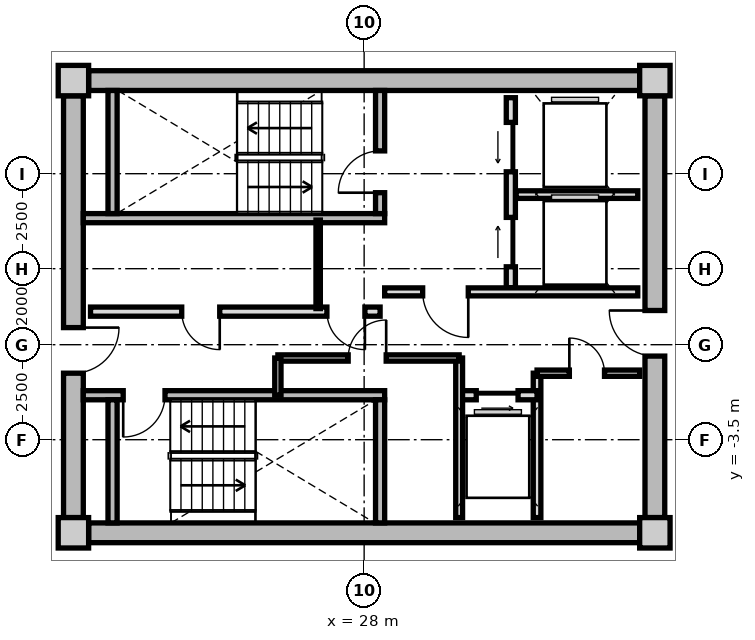
"""IFC4 building model, lengths in metres.
Left out: names, types, materials, properties, quantities, classifications, styles, units other than length and angle.
Written with IfcOpenShell. Run it as: python <this file> out.ifc"""

import sys

from ifc_helpers import new_model, si_unit, direction, frame, frame_2d, origin, origin_2d, place, context, subcontext, project, spatial, rectangle, extrude, source, transform, mapped, element, fill, save


model = new_model("IFC4")
c1 = context("Model", 3, precision=1e-05, world=origin(), true_north=direction((0.0, 1.0)))
c2 = subcontext(c1, "Body", "Model", "MODEL_VIEW")
j1 = project(units=[si_unit("LENGTHUNIT", "METRE"), si_unit("PLANEANGLEUNIT", "RADIAN")], contexts=[c1])
p1 = place(None, origin())
s1 = spatial("IfcSite", under=j1, at=p1, CompositionType="ELEMENT")
p2 = place(p1, origin())
s2 = spatial("IfcBuilding", under=s1, at=p2, CompositionType="ELEMENT")
p3 = place(p2, frame((0.0, 0.0, 216.95)))
s3 = spatial("IfcBuildingStorey", under=s2, at=p3, CompositionType="ELEMENT", Elevation=216.95)
m1 = source(origin(), c2, "Body", "SweptSolid", [
    extrude(rectangle(XDim=0.8, YDim=0.8, at=origin_2d()), origin(), (0.0, 0.0, 1.0), 3.05),
])
for number, where, z_axis, x_axis in (
    (1, (20.35, -5.95, 0.0), (0.0, 0.0, 1.0), (1.0, 0.0, 0.0)),
    (2, (35.65, -5.95, 0.0), (0.0, 0.0, 1.0), (1.0, 0.0, 0.0)),
    (3, (35.65, 5.95, 0.0), (0.0, 0.0, 1.0), (1.0, 0.0, 0.0)),
    (4, (20.35, 5.95, 0.0), (0.0, 0.0, 1.0), (1.0, 0.0, 0.0)),
):
    element("IfcColumn", number, at=place(p3, frame(where, z_axis=z_axis, x_axis=x_axis)), inside=s3, PredefinedType="COLUMN", context=c2, shape_type="MappedRepresentation", body=[
        mapped(m1, transform((0.0, 0.0, 0.0), x_axis=(1.0, 0.0, 0.0), y_axis=(0.0, 1.0, 0.0), z_axis=(0.0, 0.0, 1.0), scale=1.0)),
    ])
m2 = source(origin(), c2, "Body", "SweptSolid", [
    extrude(rectangle(XDim=14.5, YDim=0.52, at=frame_2d((7.25, 0.0))), origin(), (0.0, 0.0, 1.0), 2.76),
])
for number, where, z_axis, x_axis in (
    (5, (20.75, 5.95, 0.0), (0.0, 0.0, 1.0), (1.0, 0.0, 0.0)),
    (6, (35.25, -5.95, 0.0), (0.0, 0.0, 1.0), (-1.0, 0.0, 0.0)),
):
    element("IfcWall", number, at=place(p3, frame(where, z_axis=z_axis, x_axis=x_axis)), inside=s3, PredefinedType="SHEAR", context=c2, shape_type="MappedRepresentation", body=[
        mapped(m2, transform((0.0, 0.0, 0.0), x_axis=(1.0, 0.0, 0.0), y_axis=(0.0, 1.0, 0.0), z_axis=(0.0, 0.0, 1.0), scale=1.0)),
    ])
m3 = source(origin(), c2, "Body", "SweptSolid", [
    extrude(rectangle(XDim=11.1, YDim=0.52, at=frame_2d((5.55, 0.0))), origin(), (0.0, 0.0, 1.0), 2.76),
])
p4 = place(p3, frame((20.35, -5.55, 0.0), z_axis=(0.0, 0.0, 1.0), x_axis=(0.0, 1.0, 0.0)))
e7 = element("IfcWall", 7, at=p4, inside=s3, PredefinedType="SHEAR", context=c2, shape_type="MappedRepresentation", body=[
    mapped(m3, transform((0.0, 0.0, 0.0), x_axis=(1.0, 0.0, 0.0), y_axis=(0.0, 1.0, 0.0), z_axis=(0.0, 0.0, 1.0), scale=1.0)),
])
p5 = place(p4, frame((3.8, 0.0, 0.0)))
e8 = element("IfcOpeningElement", 8, at=p5, cuts=e7, PredefinedType="OPENING", context=c2, shape_type="SweptSolid", body=[
    extrude(rectangle(XDim=1.2, YDim=2.15, at=frame_2d((0.6, 1.075))), frame((0.0, 0.27, 0.0), z_axis=(0.0, -1.0, 0.0), x_axis=(1.0, 0.0, 0.0)), (0.0, 0.0, 1.0), 0.54),
])
p6 = place(p3, frame((35.65, 5.55, 0.0), z_axis=(0.0, 0.0, 1.0), x_axis=(0.0, -1.0, 0.0)))
e9 = element("IfcWall", 9, at=p6, inside=s3, PredefinedType="SHEAR", context=c2, shape_type="MappedRepresentation", body=[
    mapped(m3, transform((0.0, 0.0, 0.0), x_axis=(1.0, 0.0, 0.0), y_axis=(0.0, 1.0, 0.0), z_axis=(0.0, 0.0, 1.0), scale=1.0)),
])
p7 = place(p6, frame((5.65, 0.0, 0.0)))
e10 = element("IfcOpeningElement", 10, at=p7, cuts=e9, PredefinedType="OPENING", context=c2, shape_type="SweptSolid", body=[
    extrude(rectangle(XDim=1.2, YDim=2.15, at=frame_2d((0.6, 1.075))), frame((0.0, 0.27, 0.0), z_axis=(0.0, -1.0, 0.0), x_axis=(1.0, 0.0, 0.0)), (0.0, 0.0, 1.0), 0.54),
])
m4 = source(origin(), c2, "Body", "SweptSolid", [
    extrude(rectangle(XDim=7.93, YDim=0.24, at=frame_2d((3.965, 0.0))), origin(), (0.0, 0.0, 1.0), 2.76),
])
p8 = place(p3, frame((20.61, 2.33, 0.0), z_axis=(0.0, 0.0, 1.0), x_axis=(1.0, 0.0, 0.0)))
e11 = element("IfcWall", 11, at=p8, inside=s3, PredefinedType="PARTITIONING", context=c2, shape_type="MappedRepresentation", body=[
    mapped(m4, transform((0.0, 0.0, 0.0), x_axis=(1.0, 0.0, 0.0), y_axis=(0.0, 1.0, 0.0), z_axis=(0.0, 0.0, 1.0), scale=1.0)),
])
m5 = source(origin(), c2, "Body", "SweptSolid", [
    extrude(rectangle(XDim=3.24, YDim=0.24, at=frame_2d((1.62, 0.0))), origin(), (0.0, 0.0, 1.0), 2.76),
])
p9 = place(p3, frame((21.38, 2.45, 0.0), z_axis=(0.0, 0.0, 1.0), x_axis=(0.0, 1.0, 0.0)))
e12 = element("IfcWall", 12, at=p9, inside=s3, PredefinedType="PARTITIONING", context=c2, shape_type="MappedRepresentation", body=[
    mapped(m5, transform((0.0, 0.0, 0.0), x_axis=(1.0, 0.0, 0.0), y_axis=(0.0, 1.0, 0.0), z_axis=(0.0, 0.0, 1.0), scale=1.0)),
])
p10 = place(p3, frame((28.42, 2.45, 0.0), z_axis=(0.0, 0.0, 1.0), x_axis=(0.0, 1.0, 0.0)))
e13 = element("IfcWall", 13, at=p10, inside=s3, PredefinedType="PARTITIONING", context=c2, shape_type="MappedRepresentation", body=[
    mapped(m5, transform((0.0, 0.0, 0.0), x_axis=(1.0, 0.0, 0.0), y_axis=(0.0, 1.0, 0.0), z_axis=(0.0, 0.0, 1.0), scale=1.0)),
])
p11 = place(p10, frame((0.55, 0.0, 0.0)))
e14 = element("IfcOpeningElement", 14, at=p11, cuts=e13, PredefinedType="OPENING", context=c2, shape_type="SweptSolid", body=[
    extrude(rectangle(XDim=1.1, YDim=2.15, at=frame_2d((0.55, 1.075))), frame((0.0, 0.13, 0.0), z_axis=(0.0, -1.0, 0.0), x_axis=(1.0, 0.0, 0.0)), (0.0, 0.0, 1.0), 0.26),
])
p12 = place(p3, frame((20.61, -2.33, 0.0), z_axis=(0.0, 0.0, 1.0), x_axis=(1.0, 0.0, 0.0)))
e15 = element("IfcWall", 15, at=p12, inside=s3, PredefinedType="PARTITIONING", context=c2, shape_type="MappedRepresentation", body=[
    mapped(m4, transform((0.0, 0.0, 0.0), x_axis=(1.0, 0.0, 0.0), y_axis=(0.0, 1.0, 0.0), z_axis=(0.0, 0.0, 1.0), scale=1.0)),
])
p13 = place(p12, frame((1.05, 0.0, 0.0)))
e16 = element("IfcOpeningElement", 16, at=p13, cuts=e15, PredefinedType="OPENING", context=c2, shape_type="SweptSolid", body=[
    extrude(rectangle(XDim=1.1, YDim=2.15, at=frame_2d((0.55, 1.075))), frame((0.0, 0.13, 0.0), z_axis=(0.0, -1.0, 0.0), x_axis=(1.0, 0.0, 0.0)), (0.0, 0.0, 1.0), 0.26),
])
for number, where, z_axis, x_axis in (
    (17, (21.38, -5.69, 0.0), (0.0, 0.0, 1.0), (0.0, 1.0, 0.0)),
    (18, (28.42, -5.69, 0.0), (0.0, 0.0, 1.0), (0.0, 1.0, 0.0)),
):
    element("IfcWall", number, at=place(p3, frame(where, z_axis=z_axis, x_axis=x_axis)), inside=s3, PredefinedType="PARTITIONING", context=c2, shape_type="MappedRepresentation", body=[
        mapped(m5, transform((0.0, 0.0, 0.0), x_axis=(1.0, 0.0, 0.0), y_axis=(0.0, 1.0, 0.0), z_axis=(0.0, 0.0, 1.0), scale=1.0)),
    ])
m6 = source(origin(), c2, "Body", "SweptSolid", [
    extrude(rectangle(XDim=5.0, YDim=0.24, at=frame_2d((2.5, 0.0))), origin(), (0.0, 0.0, 1.0), 2.745),
])
p14 = place(p3, frame((31.86, 0.5, 0.0), z_axis=(0.0, 0.0, 1.0), x_axis=(0.0, 1.0, 0.0)))
e19 = element("IfcWall", 19, at=p14, inside=s3, PredefinedType="PARTITIONING", context=c2, shape_type="MappedRepresentation", body=[
    mapped(m6, transform((0.0, 0.0, 0.0), x_axis=(1.0, 0.0, 0.0), y_axis=(0.0, 1.0, 0.0), z_axis=(0.0, 0.0, 1.0), scale=1.0)),
])
p15 = place(p14, frame((3.05, 0.0, 0.0)))
e20 = element("IfcOpeningElement", 20, at=p15, cuts=e19, PredefinedType="OPENING", context=c2, shape_type="SweptSolid", body=[
    extrude(rectangle(XDim=1.3, YDim=2.2, at=frame_2d((0.65, 1.1))), frame((0.0, 0.13, 0.0), z_axis=(0.0, -1.0, 0.0), x_axis=(1.0, 0.0, 0.0)), (0.0, 0.0, 1.0), 0.26),
])
p16 = place(p14, frame((0.55, 0.0, 0.0)))
e21 = element("IfcOpeningElement", 21, at=p16, cuts=e19, PredefinedType="OPENING", context=c2, shape_type="SweptSolid", body=[
    extrude(rectangle(XDim=1.3, YDim=2.2, at=frame_2d((0.65, 1.1))), frame((0.0, 0.13, 0.0), z_axis=(0.0, -1.0, 0.0), x_axis=(1.0, 0.0, 0.0)), (0.0, 0.0, 1.0), 0.26),
])
m7 = source(origin(), c2, "Body", "SweptSolid", [
    extrude(rectangle(XDim=3.2, YDim=0.2, at=frame_2d((1.6, 0.0))), origin(), (0.0, 0.0, 1.0), 2.745),
])
p17 = place(p3, frame((32.0, 2.95, 0.0), z_axis=(0.0, 0.0, 1.0), x_axis=(1.0, 0.0, 0.0)))
e22 = element("IfcWall", 22, at=p17, inside=s3, PredefinedType="PARTITIONING", context=c2, shape_type="MappedRepresentation", body=[
    mapped(m7, transform((0.0, 0.0, 0.0), x_axis=(1.0, 0.0, 0.0), y_axis=(0.0, 1.0, 0.0), z_axis=(0.0, 0.0, 1.0), scale=1.0)),
])
m8 = source(origin(), c2, "Body", "SweptSolid", [
    extrude(rectangle(XDim=6.66, YDim=0.21, at=frame_2d((3.33, 0.0))), origin(), (0.0, 0.0, 1.0), 2.745),
])
p18 = place(p3, frame((28.54, 0.39, 0.0), z_axis=(0.0, 0.0, 1.0), x_axis=(1.0, 0.0, 0.0)))
e23 = element("IfcWall", 23, at=p18, inside=s3, PredefinedType="PARTITIONING", context=c2, shape_type="MappedRepresentation", body=[
    mapped(m8, transform((0.0, 0.0, 0.0), x_axis=(1.0, 0.0, 0.0), y_axis=(0.0, 1.0, 0.0), z_axis=(0.0, 0.0, 1.0), scale=1.0)),
])
p19 = place(p18, frame((1.0, 0.0, 0.0)))
e24 = element("IfcOpeningElement", 24, at=p19, cuts=e23, PredefinedType="OPENING", context=c2, shape_type="SweptSolid", body=[
    extrude(rectangle(XDim=1.2, YDim=2.15, at=frame_2d((0.6, 1.075))), frame((0.0, 0.115, 0.0), z_axis=(0.0, -1.0, 0.0), x_axis=(1.0, 0.0, 0.0)), (0.0, 0.0, 1.0), 0.23),
])
m9 = source(origin(), c2, "Body", "SweptSolid", [
    extrude(rectangle(XDim=7.62, YDim=0.24, at=frame_2d((3.81, 0.0))), origin(), (0.0, 0.0, 1.0), 2.745),
])
p20 = place(p3, frame((20.8, -0.13, 0.0), z_axis=(0.0, 0.0, 1.0), x_axis=(1.0, 0.0, 0.0)))
e25 = element("IfcWall", 25, at=p20, inside=s3, PredefinedType="PARTITIONING", context=c2, shape_type="MappedRepresentation", body=[
    mapped(m9, transform((0.0, 0.0, 0.0), x_axis=(1.0, 0.0, 0.0), y_axis=(0.0, 1.0, 0.0), z_axis=(0.0, 0.0, 1.0), scale=1.0)),
])
p21 = place(p20, frame((6.22, 0.0, 0.0)))
e26 = element("IfcOpeningElement", 26, at=p21, cuts=e25, PredefinedType="OPENING", context=c2, shape_type="SweptSolid", body=[
    extrude(rectangle(XDim=1.0, YDim=2.1, at=frame_2d((0.5, 1.05))), frame((0.0, 0.13, 0.0), z_axis=(0.0, -1.0, 0.0), x_axis=(1.0, 0.0, 0.0)), (0.0, 0.0, 1.0), 0.26),
])
p22 = place(p20, frame((2.4, 0.0, 0.0)))
e27 = element("IfcOpeningElement", 27, at=p22, cuts=e25, PredefinedType="OPENING", context=c2, shape_type="SweptSolid", body=[
    extrude(rectangle(XDim=1.0, YDim=2.1, at=frame_2d((0.5, 1.05))), frame((0.0, 0.13, 0.0), z_axis=(0.0, -1.0, 0.0), x_axis=(1.0, 0.0, 0.0)), (0.0, 0.0, 1.0), 0.26),
])
m10 = source(origin(), c2, "Body", "SweptSolid", [
    extrude(rectangle(XDim=2.33, YDim=0.115, at=frame_2d((1.165, 0.0))), origin(), (0.0, 0.0, 1.0), 2.745),
])
p23 = place(p3, frame((26.79, -0.05, 0.0), z_axis=(0.0, 0.0, 1.0), x_axis=(0.0, 1.0, 0.0)))
e28 = element("IfcWall", 28, at=p23, inside=s3, PredefinedType="PARTITIONING", context=c2, shape_type="MappedRepresentation", body=[
    mapped(m10, transform((0.0, 0.0, 0.0), x_axis=(1.0, 0.0, 0.0), y_axis=(0.0, 1.0, 0.0), z_axis=(0.0, 0.0, 1.0), scale=1.0)),
])
m11 = source(origin(), c2, "Body", "SweptSolid", [
    extrude(rectangle(XDim=3.8, YDim=0.2, at=frame_2d((1.9, 0.0))), origin(), (0.0, 0.0, 1.0), 2.745),
])
p24 = place(p3, frame((32.55, -5.55, 0.0), z_axis=(0.0, 0.0, 1.0), x_axis=(0.0, 1.0, 0.0)))
e29 = element("IfcWall", 29, at=p24, inside=s3, PredefinedType="PARTITIONING", context=c2, shape_type="MappedRepresentation", body=[
    mapped(m11, transform((0.0, 0.0, 0.0), x_axis=(1.0, 0.0, 0.0), y_axis=(0.0, 1.0, 0.0), z_axis=(0.0, 0.0, 1.0), scale=1.0)),
])
m12 = source(origin(), c2, "Body", "SweptSolid", [
    extrude(rectangle(XDim=2.05, YDim=0.24, at=frame_2d((1.025, 0.0))), origin(), (0.0, 0.0, 1.0), 2.745),
])
p25 = place(p3, frame((30.5, -2.33, 0.0), z_axis=(0.0, 0.0, 1.0), x_axis=(1.0, 0.0, 0.0)))
e30 = element("IfcWall", 30, at=p25, inside=s3, PredefinedType="PARTITIONING", context=c2, shape_type="MappedRepresentation", body=[
    mapped(m12, transform((0.0, 0.0, 0.0), x_axis=(1.0, 0.0, 0.0), y_axis=(0.0, 1.0, 0.0), z_axis=(0.0, 0.0, 1.0), scale=1.0)),
])
p26 = place(p25, frame((0.45, 0.0, 0.0)))
e31 = element("IfcOpeningElement", 31, at=p26, cuts=e30, PredefinedType="OPENING", context=c2, shape_type="SweptSolid", body=[
    extrude(rectangle(XDim=1.1, YDim=2.2, at=frame_2d((0.55, 1.1))), frame((0.0, 0.13, 0.0), z_axis=(0.0, -1.0, 0.0), x_axis=(1.0, 0.0, 0.0)), (0.0, 0.0, 1.0), 0.26),
])
m13 = source(origin(), c2, "Body", "SweptSolid", [
    extrude(rectangle(XDim=4.2, YDim=0.18, at=frame_2d((2.1, 0.0))), origin(), (0.0, 0.0, 1.0), 2.745),
])
p27 = place(p3, frame((30.5, -5.55, 0.0), z_axis=(0.0, 0.0, 1.0), x_axis=(0.0, 1.0, 0.0)))
e32 = element("IfcWall", 32, at=p27, inside=s3, PredefinedType="PARTITIONING", context=c2, shape_type="MappedRepresentation", body=[
    mapped(m13, transform((0.0, 0.0, 0.0), x_axis=(1.0, 0.0, 0.0), y_axis=(0.0, 1.0, 0.0), z_axis=(0.0, 0.0, 1.0), scale=1.0)),
])
m14 = source(origin(), c2, "Body", "SweptSolid", [
    extrude(rectangle(XDim=4.77, YDim=0.165, at=frame_2d((2.385, 0.0))), origin(), (0.0, 0.0, 1.0), 2.745),
])
p28 = place(p3, frame((25.73, -1.35, 0.0), z_axis=(0.0, 0.0, 1.0), x_axis=(1.0, 0.0, 0.0)))
e33 = element("IfcWall", 33, at=p28, inside=s3, PredefinedType="PARTITIONING", context=c2, shape_type="MappedRepresentation", body=[
    mapped(m14, transform((0.0, 0.0, 0.0), x_axis=(1.0, 0.0, 0.0), y_axis=(0.0, 1.0, 0.0), z_axis=(0.0, 0.0, 1.0), scale=1.0)),
])
p29 = place(p28, frame((1.85, 0.0, 0.0)))
e34 = element("IfcOpeningElement", 34, at=p29, cuts=e33, PredefinedType="OPENING", context=c2, shape_type="SweptSolid", body=[
    extrude(rectangle(XDim=1.0, YDim=2.1, at=frame_2d((0.5, 1.05))), frame((0.0, 0.093, 0.0), z_axis=(0.0, -1.0, 0.0), x_axis=(1.0, 0.0, 0.0)), (0.0, 0.0, 1.0), 0.185),
])
m15 = source(origin(), c2, "Body", "SweptSolid", [
    extrude(rectangle(XDim=0.98, YDim=0.165, at=frame_2d((0.49, 0.0))), origin(), (0.0, 0.0, 1.0), 2.745),
])
p30 = place(p3, frame((25.73, -2.33, 0.0), z_axis=(0.0, 0.0, 1.0), x_axis=(0.0, 1.0, 0.0)))
e35 = element("IfcWall", 35, at=p30, inside=s3, PredefinedType="PARTITIONING", context=c2, shape_type="MappedRepresentation", body=[
    mapped(m15, transform((0.0, 0.0, 0.0), x_axis=(1.0, 0.0, 0.0), y_axis=(0.0, 1.0, 0.0), z_axis=(0.0, 0.0, 1.0), scale=1.0)),
])
m16 = source(origin(), c2, "Body", "SweptSolid", [
    extrude(rectangle(XDim=2.7, YDim=0.165, at=frame_2d((1.35, 0.0))), origin(), (0.0, 0.0, 1.0), 2.745),
])
p31 = place(p3, frame((32.55, -1.75, 0.0), z_axis=(0.0, 0.0, 1.0), x_axis=(1.0, 0.0, 0.0)))
e36 = element("IfcWall", 36, at=p31, inside=s3, PredefinedType="PARTITIONING", context=c2, shape_type="MappedRepresentation", body=[
    mapped(m16, transform((0.0, 0.0, 0.0), x_axis=(1.0, 0.0, 0.0), y_axis=(0.0, 1.0, 0.0), z_axis=(0.0, 0.0, 1.0), scale=1.0)),
])
p32 = place(p31, frame((0.85, 0.0, 0.0)))
e37 = element("IfcOpeningElement", 37, at=p32, cuts=e36, PredefinedType="OPENING", context=c2, shape_type="SweptSolid", body=[
    extrude(rectangle(XDim=0.925, YDim=2.1, at=frame_2d((0.462, 1.05))), frame((0.0, 0.093, 0.0), z_axis=(0.0, -1.0, 0.0), x_axis=(1.0, 0.0, 0.0)), (0.0, 0.0, 1.0), 0.185),
])
m17 = source(origin(), c2, "Body", "SweptSolid", [
    extrude(rectangle(XDim=1.1, YDim=2.15, at=frame_2d((0.55, 1.075))), frame((0.0, 0.025, 0.0), z_axis=(0.0, -1.0, 0.0), x_axis=(1.0, 0.0, 0.0)), (0.0, 0.0, 1.0), 0.05),
])
p33 = place(p11, origin())
e38 = element("IfcDoor", 38, at=p33, inside=s3, OperationType="SINGLE_SWING_LEFT", PredefinedType="DOOR", context=c2, shape_type="MappedRepresentation", body=[
    mapped(m17, transform((0.0, 0.0, 0.0), x_axis=(1.0, 0.0, 0.0), y_axis=(0.0, 1.0, 0.0), z_axis=(0.0, 0.0, 1.0), scale=1.0)),
])
fill(e14, e38)
p34 = place(p13, frame((1.1, 0.0, 0.0), z_axis=(0.0, 0.0, 1.0), x_axis=(-1.0, 0.0, 0.0)))
e39 = element("IfcDoor", 39, at=p34, inside=s3, OperationType="SINGLE_SWING_RIGHT", PredefinedType="DOOR", context=c2, shape_type="MappedRepresentation", body=[
    mapped(m17, transform((0.0, 0.0, 0.0), x_axis=(1.0, 0.0, 0.0), y_axis=(0.0, 1.0, 0.0), z_axis=(0.0, 0.0, 1.0), scale=1.0)),
])
fill(e16, e39)
m18 = source(origin(), c2, "Body", "SweptSolid", [
    extrude(rectangle(XDim=1.3, YDim=2.2, at=frame_2d((0.65, 1.1))), frame((0.0, 0.025, 0.0), z_axis=(0.0, -1.0, 0.0), x_axis=(1.0, 0.0, 0.0)), (0.0, 0.0, 1.0), 0.05),
])
p35 = place(p15, origin())
e40 = element("IfcDoor", 40, at=p35, inside=s3, OperationType="SLIDING_TO_LEFT", PredefinedType="DOOR", context=c2, shape_type="MappedRepresentation", body=[
    mapped(m18, transform((0.0, 0.0, 0.0), x_axis=(1.0, 0.0, 0.0), y_axis=(0.0, 1.0, 0.0), z_axis=(0.0, 0.0, 1.0), scale=1.0)),
])
fill(e20, e40)
p36 = place(p16, origin())
e41 = element("IfcDoor", 41, at=p36, inside=s3, OperationType="SLIDING_TO_RIGHT", PredefinedType="DOOR", context=c2, shape_type="MappedRepresentation", body=[
    mapped(m18, transform((0.0, 0.0, 0.0), x_axis=(1.0, 0.0, 0.0), y_axis=(0.0, 1.0, 0.0), z_axis=(0.0, 0.0, 1.0), scale=1.0)),
])
fill(e21, e41)
m19 = source(origin(), c2, "Body", "SweptSolid", [
    extrude(rectangle(XDim=1.2, YDim=2.15, at=frame_2d((0.6, 1.075))), frame((0.0, 0.025, 0.0), z_axis=(0.0, -1.0, 0.0), x_axis=(1.0, 0.0, 0.0)), (0.0, 0.0, 1.0), 0.05),
])
p37 = place(p19, frame((1.2, 0.0, 0.0), z_axis=(0.0, 0.0, 1.0), x_axis=(-1.0, 0.0, 0.0)))
e42 = element("IfcDoor", 42, at=p37, inside=s3, OperationType="SINGLE_SWING_LEFT", PredefinedType="DOOR", context=c2, shape_type="MappedRepresentation", body=[
    mapped(m19, transform((0.0, 0.0, 0.0), x_axis=(1.0, 0.0, 0.0), y_axis=(0.0, 1.0, 0.0), z_axis=(0.0, 0.0, 1.0), scale=1.0)),
])
fill(e24, e42)
p38 = place(p5, frame((1.2, 0.0, 0.0), z_axis=(0.0, 0.0, 1.0), x_axis=(-1.0, 0.0, 0.0)))
e43 = element("IfcDoor", 43, at=p38, inside=s3, OperationType="SINGLE_SWING_LEFT", PredefinedType="DOOR", context=c2, shape_type="MappedRepresentation", body=[
    mapped(m19, transform((0.0, 0.0, 0.0), x_axis=(1.0, 0.0, 0.0), y_axis=(0.0, 1.0, 0.0), z_axis=(0.0, 0.0, 1.0), scale=1.0)),
])
fill(e8, e43)
p39 = place(p7, frame((1.2, 0.0, 0.0), z_axis=(0.0, 0.0, 1.0), x_axis=(-1.0, 0.0, 0.0)))
e44 = element("IfcDoor", 44, at=p39, inside=s3, OperationType="SINGLE_SWING_RIGHT", PredefinedType="DOOR", context=c2, shape_type="MappedRepresentation", body=[
    mapped(m19, transform((0.0, 0.0, 0.0), x_axis=(1.0, 0.0, 0.0), y_axis=(0.0, 1.0, 0.0), z_axis=(0.0, 0.0, 1.0), scale=1.0)),
])
fill(e10, e44)
m20 = source(origin(), c2, "Body", "SweptSolid", [
    extrude(rectangle(XDim=1.0, YDim=2.1, at=frame_2d((0.5, 1.05))), frame((0.0, 0.025, 0.0), z_axis=(0.0, -1.0, 0.0), x_axis=(1.0, 0.0, 0.0)), (0.0, 0.0, 1.0), 0.05),
])
p40 = place(p21, frame((1.0, 0.0, 0.0), z_axis=(0.0, 0.0, 1.0), x_axis=(-1.0, 0.0, 0.0)))
e45 = element("IfcDoor", 45, at=p40, inside=s3, OperationType="SINGLE_SWING_LEFT", PredefinedType="DOOR", context=c2, shape_type="MappedRepresentation", body=[
    mapped(m20, transform((0.0, 0.0, 0.0), x_axis=(1.0, 0.0, 0.0), y_axis=(0.0, 1.0, 0.0), z_axis=(0.0, 0.0, 1.0), scale=1.0)),
])
fill(e26, e45)
p41 = place(p22, frame((1.0, 0.0, 0.0), z_axis=(0.0, 0.0, 1.0), x_axis=(-1.0, 0.0, 0.0)))
e46 = element("IfcDoor", 46, at=p41, inside=s3, OperationType="SINGLE_SWING_LEFT", PredefinedType="DOOR", context=c2, shape_type="MappedRepresentation", body=[
    mapped(m20, transform((0.0, 0.0, 0.0), x_axis=(1.0, 0.0, 0.0), y_axis=(0.0, 1.0, 0.0), z_axis=(0.0, 0.0, 1.0), scale=1.0)),
])
fill(e27, e46)
m21 = source(origin(), c2, "Body", "SweptSolid", [
    extrude(rectangle(XDim=1.1, YDim=2.2, at=frame_2d((0.55, 1.1))), frame((0.0, 0.025, 0.0), z_axis=(0.0, -1.0, 0.0), x_axis=(1.0, 0.0, 0.0)), (0.0, 0.0, 1.0), 0.05),
])
p42 = place(p26, frame((1.1, 0.0, 0.0), z_axis=(0.0, 0.0, 1.0), x_axis=(-1.0, 0.0, 0.0)))
e47 = element("IfcDoor", 47, at=p42, inside=s3, OperationType="SLIDING_TO_RIGHT", PredefinedType="DOOR", context=c2, shape_type="MappedRepresentation", body=[
    mapped(m21, transform((0.0, 0.0, 0.0), x_axis=(1.0, 0.0, 0.0), y_axis=(0.0, 1.0, 0.0), z_axis=(0.0, 0.0, 1.0), scale=1.0)),
])
fill(e31, e47)
p43 = place(p29, origin())
e48 = element("IfcDoor", 48, at=p43, inside=s3, OperationType="SINGLE_SWING_RIGHT", PredefinedType="DOOR", context=c2, shape_type="MappedRepresentation", body=[
    mapped(m20, transform((0.0, 0.0, 0.0), x_axis=(1.0, 0.0, 0.0), y_axis=(0.0, 1.0, 0.0), z_axis=(0.0, 0.0, 1.0), scale=1.0)),
])
fill(e34, e48)
m22 = source(origin(), c2, "Body", "SweptSolid", [
    extrude(rectangle(XDim=0.925, YDim=2.1, at=frame_2d((0.462, 1.05))), frame((0.0, 0.025, 0.0), z_axis=(0.0, -1.0, 0.0), x_axis=(1.0, 0.0, 0.0)), (0.0, 0.0, 1.0), 0.05),
])
p44 = place(p32, origin())
e49 = element("IfcDoor", 49, at=p44, inside=s3, OperationType="SINGLE_SWING_LEFT", PredefinedType="DOOR", context=c2, shape_type="MappedRepresentation", body=[
    mapped(m22, transform((0.0, 0.0, 0.0), x_axis=(1.0, 0.0, 0.0), y_axis=(0.0, 1.0, 0.0), z_axis=(0.0, 0.0, 1.0), scale=1.0)),
])
fill(e37, e49)
save(model, sys.argv[1])
